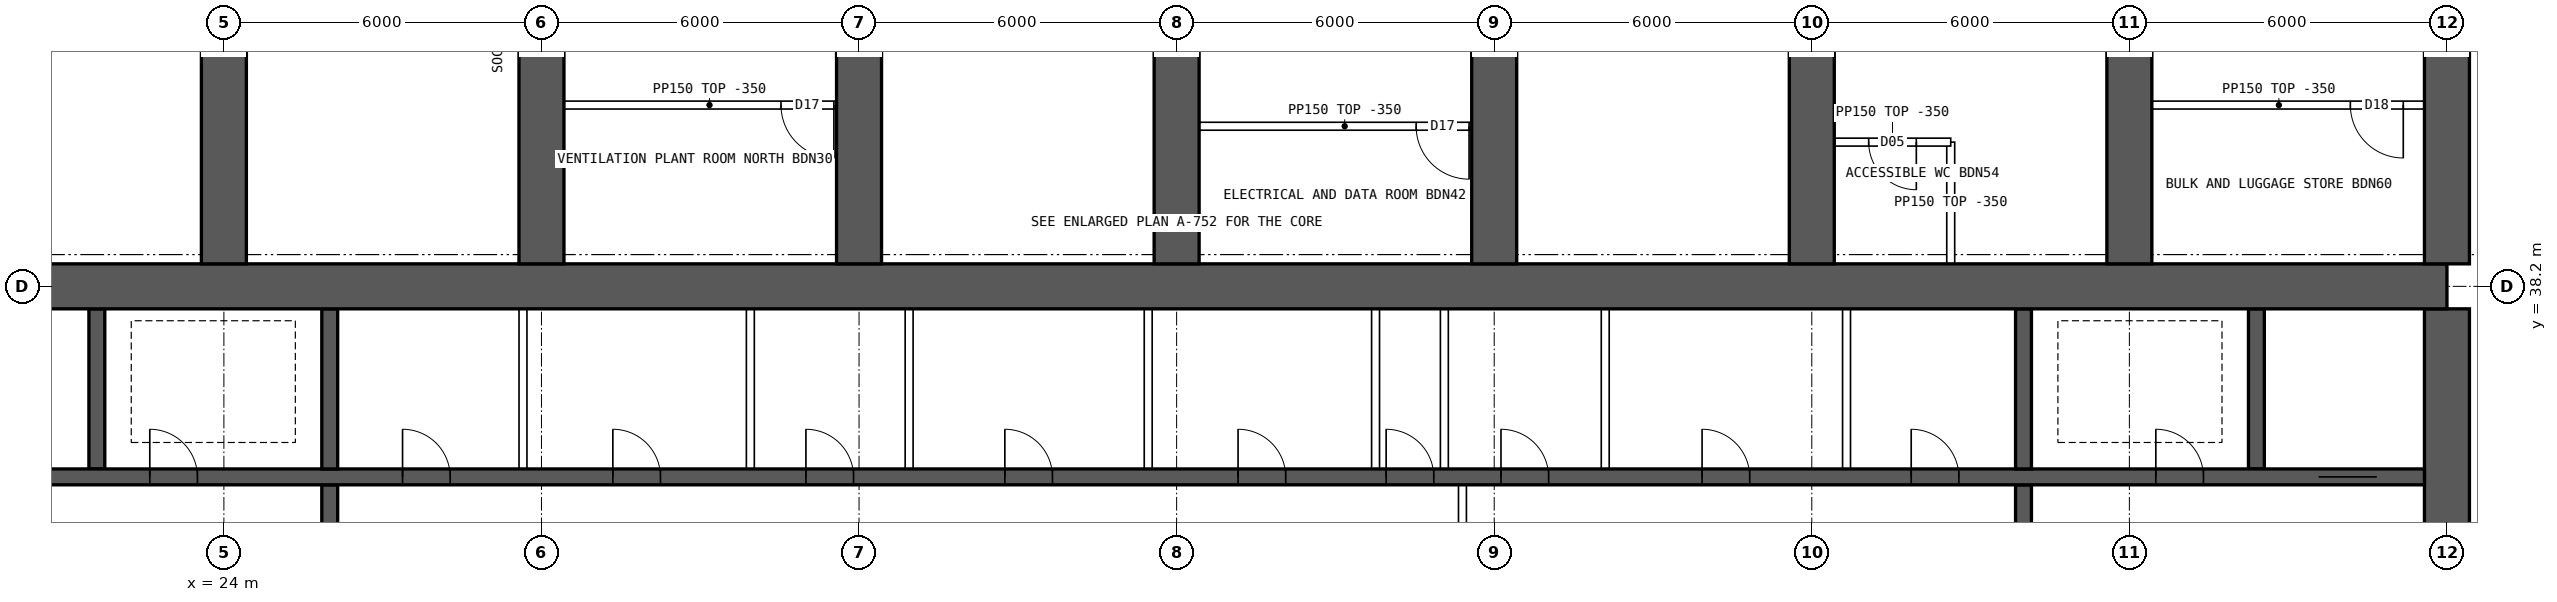
"""IFC4 building model, lengths in metres.
Left out: names, types, materials, properties, quantities, classifications, styles, units other than length and angle.
Written with IfcOpenShell. Run it as: python <this file> out.ifc"""

import sys

from ifc_helpers import new_model, si_unit, direction, frame, frame_2d, origin, place, context, subcontext, project, spatial, rectangle, extrude, element, fill, save


model = new_model("IFC4")
c1 = context("Model", 3, precision=1e-05, world=origin(), true_north=direction((0.0, 1.0)))
c2 = subcontext(c1, "Body", "Model", "MODEL_VIEW")
j1 = project(units=[si_unit("LENGTHUNIT", "METRE"), si_unit("PLANEANGLEUNIT", "RADIAN")], contexts=[c1])
p1 = place(None, origin())
s1 = spatial("IfcSite", under=j1, at=p1, CompositionType="ELEMENT")
p2 = place(p1, origin())
s2 = spatial("IfcBuilding", under=s1, at=p2, CompositionType="ELEMENT")
p3 = place(p2, frame((0.0, 0.0, 197.35)))
s3 = spatial("IfcBuildingStorey", under=s2, at=p3, CompositionType="ELEMENT", Elevation=197.35)
p4 = place(p3, frame((18.0, 38.2, 0.0), z_axis=(0.0, 0.0, 1.0), x_axis=(1.0, 0.0, 0.0)))
e1 = element("IfcWall", 1, at=p4, inside=s3, PredefinedType="SHEAR", context=c2, shape_type="SweptSolid", body=[
    extrude(rectangle(XDim=48.0, YDim=0.85, at=frame_2d((24.0, 0.0))), origin(), (0.0, 0.0, 1.0), 3.75),
])
p5 = place(p3, frame((66.0, 26.225, 0.0), z_axis=(0.0, 0.0, 1.0), x_axis=(0.0, 1.0, 0.0)))
e2 = element("IfcWall", 2, at=p5, inside=s3, PredefinedType="SHEAR", context=c2, shape_type="SweptSolid", body=[
    extrude(rectangle(XDim=11.55, YDim=0.85, at=frame_2d((5.775, 0.0))), origin(), (0.0, 0.0, 1.0), 3.75),
])
p6 = place(p5, frame((5.075, 0.0, 0.0)))
e3 = element("IfcOpeningElement", 3, at=p6, cuts=e2, PredefinedType="OPENING", context=c2, shape_type="SweptSolid", body=[
    extrude(rectangle(XDim=1.2, YDim=2.1, at=frame_2d((0.6, 1.05))), frame((0.0, 0.435, 0.0), z_axis=(0.0, -1.0, 0.0), x_axis=(1.0, 0.0, 0.0)), (0.0, 0.0, 1.0), 0.87),
])
p7 = place(p3, frame((18.425, 34.6, 0.0), z_axis=(0.0, 0.0, 1.0), x_axis=(1.0, 0.0, 0.0)))
e4 = element("IfcWall", 4, at=p7, inside=s3, PredefinedType="SHEAR", context=c2, shape_type="SweptSolid", body=[
    extrude(rectangle(XDim=47.15, YDim=0.3, at=frame_2d((23.575, 0.0))), origin(), (0.0, 0.0, 1.0), 3.75),
])
p8 = place(p7, frame((0.9, 0.0, 0.0)))
e5 = element("IfcOpeningElement", 5, at=p8, cuts=e4, PredefinedType="OPENING", context=c2, shape_type="SweptSolid", body=[
    extrude(rectangle(XDim=1.1, YDim=2.1, at=frame_2d((0.55, 1.05))), frame((0.0, 0.16, 0.0), z_axis=(0.0, -1.0, 0.0), x_axis=(1.0, 0.0, 0.0)), (0.0, 0.0, 1.0), 0.32),
])
p9 = place(p7, frame((45.15, 0.0, 0.0)))
e6 = element("IfcOpeningElement", 6, at=p9, cuts=e4, PredefinedType="OPENING", context=c2, shape_type="SweptSolid", body=[
    extrude(rectangle(XDim=1.1, YDim=2.1, at=frame_2d((0.55, 1.05))), frame((0.0, 0.16, 0.0), z_axis=(0.0, -1.0, 0.0), x_axis=(1.0, 0.0, 0.0)), (0.0, 0.0, 1.0), 0.32),
])
p10 = place(p7, frame((4.175, 0.0, 0.0)))
e7 = element("IfcOpeningElement", 7, at=p10, cuts=e4, PredefinedType="OPENING", context=c2, shape_type="SweptSolid", body=[
    extrude(rectangle(XDim=0.9, YDim=2.1, at=frame_2d((0.45, 1.05))), frame((0.0, 0.16, 0.0), z_axis=(0.0, -1.0, 0.0), x_axis=(1.0, 0.0, 0.0)), (0.0, 0.0, 1.0), 0.32),
])
p11 = place(p7, frame((42.075, 0.0, 0.0)))
e8 = element("IfcOpeningElement", 8, at=p11, cuts=e4, PredefinedType="OPENING", context=c2, shape_type="SweptSolid", body=[
    extrude(rectangle(XDim=0.9, YDim=2.1, at=frame_2d((0.45, 1.05))), frame((0.0, 0.16, 0.0), z_axis=(0.0, -1.0, 0.0), x_axis=(1.0, 0.0, 0.0)), (0.0, 0.0, 1.0), 0.32),
])
p12 = place(p7, frame((8.95, 0.0, 0.0)))
e9 = element("IfcOpeningElement", 9, at=p12, cuts=e4, PredefinedType="OPENING", context=c2, shape_type="SweptSolid", body=[
    extrude(rectangle(XDim=0.9, YDim=2.1, at=frame_2d((0.45, 1.05))), frame((0.0, 0.16, 0.0), z_axis=(0.0, -1.0, 0.0), x_axis=(1.0, 0.0, 0.0)), (0.0, 0.0, 1.0), 0.32),
])
p13 = place(p7, frame((12.924, 0.0, 0.0)))
e10 = element("IfcOpeningElement", 10, at=p13, cuts=e4, PredefinedType="OPENING", context=c2, shape_type="SweptSolid", body=[
    extrude(rectangle(XDim=0.9, YDim=2.1, at=frame_2d((0.45, 1.05))), frame((0.0, 0.16, 0.0), z_axis=(0.0, -1.0, 0.0), x_axis=(1.0, 0.0, 0.0)), (0.0, 0.0, 1.0), 0.32),
])
p14 = place(p7, frame((16.571, 0.0, 0.0)))
e11 = element("IfcOpeningElement", 11, at=p14, cuts=e4, PredefinedType="OPENING", context=c2, shape_type="SweptSolid", body=[
    extrude(rectangle(XDim=0.9, YDim=2.1, at=frame_2d((0.45, 1.05))), frame((0.0, 0.16, 0.0), z_axis=(0.0, -1.0, 0.0), x_axis=(1.0, 0.0, 0.0)), (0.0, 0.0, 1.0), 0.32),
])
p15 = place(p7, frame((20.33, 0.0, 0.0)))
e12 = element("IfcOpeningElement", 12, at=p15, cuts=e4, PredefinedType="OPENING", context=c2, shape_type="SweptSolid", body=[
    extrude(rectangle(XDim=0.9, YDim=2.1, at=frame_2d((0.45, 1.05))), frame((0.0, 0.16, 0.0), z_axis=(0.0, -1.0, 0.0), x_axis=(1.0, 0.0, 0.0)), (0.0, 0.0, 1.0), 0.32),
])
p16 = place(p7, frame((24.736, 0.0, 0.0)))
e13 = element("IfcOpeningElement", 13, at=p16, cuts=e4, PredefinedType="OPENING", context=c2, shape_type="SweptSolid", body=[
    extrude(rectangle(XDim=0.9, YDim=2.1, at=frame_2d((0.45, 1.05))), frame((0.0, 0.16, 0.0), z_axis=(0.0, -1.0, 0.0), x_axis=(1.0, 0.0, 0.0)), (0.0, 0.0, 1.0), 0.32),
])
p17 = place(p7, frame((27.533, 0.0, 0.0)))
e14 = element("IfcOpeningElement", 14, at=p17, cuts=e4, PredefinedType="OPENING", context=c2, shape_type="SweptSolid", body=[
    extrude(rectangle(XDim=0.9, YDim=2.1, at=frame_2d((0.45, 1.05))), frame((0.0, 0.16, 0.0), z_axis=(0.0, -1.0, 0.0), x_axis=(1.0, 0.0, 0.0)), (0.0, 0.0, 1.0), 0.32),
])
p18 = place(p7, frame((29.703, 0.0, 0.0)))
e15 = element("IfcOpeningElement", 15, at=p18, cuts=e4, PredefinedType="OPENING", context=c2, shape_type="SweptSolid", body=[
    extrude(rectangle(XDim=0.9, YDim=2.1, at=frame_2d((0.45, 1.05))), frame((0.0, 0.16, 0.0), z_axis=(0.0, -1.0, 0.0), x_axis=(1.0, 0.0, 0.0)), (0.0, 0.0, 1.0), 0.32),
])
p19 = place(p7, frame((33.502, 0.0, 0.0)))
e16 = element("IfcOpeningElement", 16, at=p19, cuts=e4, PredefinedType="OPENING", context=c2, shape_type="SweptSolid", body=[
    extrude(rectangle(XDim=0.9, YDim=2.1, at=frame_2d((0.45, 1.05))), frame((0.0, 0.16, 0.0), z_axis=(0.0, -1.0, 0.0), x_axis=(1.0, 0.0, 0.0)), (0.0, 0.0, 1.0), 0.32),
])
p20 = place(p7, frame((37.453, 0.0, 0.0)))
e17 = element("IfcOpeningElement", 17, at=p20, cuts=e4, PredefinedType="OPENING", context=c2, shape_type="SweptSolid", body=[
    extrude(rectangle(XDim=0.9, YDim=2.1, at=frame_2d((0.45, 1.05))), frame((0.0, 0.16, 0.0), z_axis=(0.0, -1.0, 0.0), x_axis=(1.0, 0.0, 0.0)), (0.0, 0.0, 1.0), 0.32),
])
p21 = place(p3, frame((26.0, 30.55, 0.0), z_axis=(0.0, 0.0, 1.0), x_axis=(0.0, 1.0, 0.0)))
e18 = element("IfcWall", 18, at=p21, inside=s3, PredefinedType="SHEAR", context=c2, shape_type="SweptSolid", body=[
    extrude(rectangle(XDim=3.9, YDim=0.3, at=frame_2d((1.95, 0.0))), origin(), (0.0, 0.0, 1.0), 3.75),
])
p22 = place(p21, frame((1.4, 0.0, 0.0)))
e19 = element("IfcOpeningElement", 19, at=p22, cuts=e18, PredefinedType="OPENING", context=c2, shape_type="SweptSolid", body=[
    extrude(rectangle(XDim=1.2, YDim=2.1, at=frame_2d((0.6, 1.05))), frame((0.0, 0.16, 0.0), z_axis=(0.0, -1.0, 0.0), x_axis=(1.0, 0.0, 0.0)), (0.0, 0.0, 1.0), 0.32),
])
p23 = place(p3, frame((58.0, 30.55, 0.0), z_axis=(0.0, 0.0, 1.0), x_axis=(0.0, 1.0, 0.0)))
e20 = element("IfcWall", 20, at=p23, inside=s3, PredefinedType="SHEAR", context=c2, shape_type="SweptSolid", body=[
    extrude(rectangle(XDim=3.9, YDim=0.3, at=frame_2d((1.95, 0.0))), origin(), (0.0, 0.0, 1.0), 3.75),
])
p24 = place(p23, frame((1.4, 0.0, 0.0)))
e21 = element("IfcOpeningElement", 21, at=p24, cuts=e20, PredefinedType="OPENING", context=c2, shape_type="SweptSolid", body=[
    extrude(rectangle(XDim=1.2, YDim=2.1, at=frame_2d((0.6, 1.05))), frame((0.0, 0.16, 0.0), z_axis=(0.0, -1.0, 0.0), x_axis=(1.0, 0.0, 0.0)), (0.0, 0.0, 1.0), 0.32),
])
for number, where, z_axis, x_axis in (
    (22, (21.6, 34.75, 0.0), (0.0, 0.0, 1.0), (0.0, 1.0, 0.0)),
    (23, (62.4, 34.75, 0.0), (0.0, 0.0, 1.0), (0.0, 1.0, 0.0)),
    (24, (26.0, 34.75, 0.0), (0.0, 0.0, 1.0), (0.0, 1.0, 0.0)),
    (25, (58.0, 34.75, 0.0), (0.0, 0.0, 1.0), (0.0, 1.0, 0.0)),
):
    element("IfcWall", number, at=place(p3, frame(where, z_axis=z_axis, x_axis=x_axis)), inside=s3, PredefinedType="SHEAR", context=c2, shape_type="SweptSolid", body=[
        extrude(rectangle(XDim=3.025, YDim=0.3, at=frame_2d((1.512, 0.0))), origin(), (0.0, 0.0, 1.0), 3.75),
    ])
for number, where, z_axis, x_axis in (
    (26, (24.0, 38.625, 0.0), (0.0, 0.0, 1.0), (0.0, 1.0, 0.0)),
    (27, (30.0, 38.625, 0.0), (0.0, 0.0, 1.0), (0.0, 1.0, 0.0)),
    (28, (36.0, 38.625, 0.0), (0.0, 0.0, 1.0), (0.0, 1.0, 0.0)),
    (29, (42.0, 38.625, 0.0), (0.0, 0.0, 1.0), (0.0, 1.0, 0.0)),
    (30, (48.0, 38.625, 0.0), (0.0, 0.0, 1.0), (0.0, 1.0, 0.0)),
    (31, (54.0, 38.625, 0.0), (0.0, 0.0, 1.0), (0.0, 1.0, 0.0)),
    (32, (60.0, 38.625, 0.0), (0.0, 0.0, 1.0), (0.0, 1.0, 0.0)),
    (33, (66.0, 38.625, 0.0), (0.0, 0.0, 1.0), (0.0, 1.0, 0.0)),
):
    element("IfcWall", number, at=place(p3, frame(where, z_axis=z_axis, x_axis=x_axis)), inside=s3, PredefinedType="SHEAR", context=c2, shape_type="SweptSolid", body=[
        extrude(rectangle(XDim=8.175, YDim=0.85, at=frame_2d((4.087, 0.0))), origin(), (0.0, 0.0, 1.0), 3.75),
    ])
p25 = place(p3, frame((47.4, 30.55, 0.0), z_axis=(0.0, 0.0, 1.0), x_axis=(0.0, 1.0, 0.0)))
e34 = element("IfcWall", 34, at=p25, inside=s3, PredefinedType="SOLIDWALL", context=c2, shape_type="SweptSolid", body=[
    extrude(rectangle(XDim=3.9, YDim=0.15, at=frame_2d((1.95, 0.0))), origin(), (0.0, 0.0, 1.0), 3.4),
])
p26 = place(p25, frame((1.15, 0.0, 0.0)))
e35 = element("IfcOpeningElement", 35, at=p26, cuts=e34, PredefinedType="OPENING", context=c2, shape_type="SweptSolid", body=[
    extrude(rectangle(XDim=1.6, YDim=2.1, at=frame_2d((0.8, 1.05))), frame((0.0, 0.085, 0.0), z_axis=(0.0, -1.0, 0.0), x_axis=(1.0, 0.0, 0.0)), (0.0, 0.0, 1.0), 0.17),
])
for number, where, z_axis, x_axis in (
    (36, (29.651, 34.75, 0.0), (0.0, 0.0, 1.0), (0.0, 1.0, 0.0)),
    (37, (33.946, 34.75, 0.0), (0.0, 0.0, 1.0), (0.0, 1.0, 0.0)),
    (38, (36.946, 34.75, 0.0), (0.0, 0.0, 1.0), (0.0, 1.0, 0.0)),
    (39, (41.463, 34.75, 0.0), (0.0, 0.0, 1.0), (0.0, 1.0, 0.0)),
    (40, (45.758, 34.75, 0.0), (0.0, 0.0, 1.0), (0.0, 1.0, 0.0)),
    (41, (47.058, 34.75, 0.0), (0.0, 0.0, 1.0), (0.0, 1.0, 0.0)),
    (42, (50.098, 34.75, 0.0), (0.0, 0.0, 1.0), (0.0, 1.0, 0.0)),
    (43, (54.657, 34.75, 0.0), (0.0, 0.0, 1.0), (0.0, 1.0, 0.0)),
):
    element("IfcWall", number, at=place(p3, frame(where, z_axis=z_axis, x_axis=x_axis)), inside=s3, PredefinedType="SOLIDWALL", context=c2, shape_type="SweptSolid", body=[
        extrude(rectangle(XDim=3.025, YDim=0.15, at=frame_2d((1.512, 0.0))), origin(), (0.0, 0.0, 1.0), 3.4),
    ])
p27 = place(p3, frame((35.925, 41.625, 0.0), z_axis=(0.0, 0.0, 1.0), x_axis=(-1.0, 0.0, 0.0)))
e44 = element("IfcWall", 44, at=p27, inside=s3, PredefinedType="PARTITIONING", context=c2, shape_type="SweptSolid", body=[
    extrude(rectangle(XDim=5.5, YDim=0.15, at=frame_2d((2.75, 0.0))), origin(), (0.0, 0.0, 1.0), 3.4),
])
p28 = place(p27, frame((0.4, 0.0, 0.0)))
e45 = element("IfcOpeningElement", 45, at=p28, cuts=e44, PredefinedType="OPENING", context=c2, shape_type="SweptSolid", body=[
    extrude(rectangle(XDim=1.0, YDim=2.1, at=frame_2d((0.5, 1.05))), frame((0.0, 0.085, 0.0), z_axis=(0.0, -1.0, 0.0), x_axis=(1.0, 0.0, 0.0)), (0.0, 0.0, 1.0), 0.17),
])
p29 = place(p3, frame((47.925, 41.225, 0.0), z_axis=(0.0, 0.0, 1.0), x_axis=(-1.0, 0.0, 0.0)))
e46 = element("IfcWall", 46, at=p29, inside=s3, PredefinedType="PARTITIONING", context=c2, shape_type="SweptSolid", body=[
    extrude(rectangle(XDim=5.5, YDim=0.15, at=frame_2d((2.75, 0.0))), origin(), (0.0, 0.0, 1.0), 3.4),
])
p30 = place(p29, frame((0.4, 0.0, 0.0)))
e47 = element("IfcOpeningElement", 47, at=p30, cuts=e46, PredefinedType="OPENING", context=c2, shape_type="SweptSolid", body=[
    extrude(rectangle(XDim=1.0, YDim=2.1, at=frame_2d((0.5, 1.05))), frame((0.0, 0.085, 0.0), z_axis=(0.0, -1.0, 0.0), x_axis=(1.0, 0.0, 0.0)), (0.0, 0.0, 1.0), 0.17),
])
p31 = place(p3, frame((56.625, 40.925, 0.0), z_axis=(0.0, 0.0, 1.0), x_axis=(0.0, -1.0, 0.0)))
e48 = element("IfcWall", 48, at=p31, inside=s3, PredefinedType="PARTITIONING", context=c2, shape_type="SweptSolid", body=[
    extrude(rectangle(XDim=2.3, YDim=0.15, at=frame_2d((1.15, 0.0))), origin(), (0.0, 0.0, 1.0), 3.4),
])
p32 = place(p3, frame((56.625, 40.925, 0.0), z_axis=(0.0, 0.0, 1.0), x_axis=(-1.0, 0.0, 0.0)))
e49 = element("IfcWall", 49, at=p32, inside=s3, PredefinedType="PARTITIONING", context=c2, shape_type="SweptSolid", body=[
    extrude(rectangle(XDim=2.2, YDim=0.15, at=frame_2d((1.1, 0.0))), origin(), (0.0, 0.0, 1.0), 3.4),
])
p33 = place(p32, frame((0.65, 0.0, 0.0)))
e50 = element("IfcOpeningElement", 50, at=p33, cuts=e49, PredefinedType="OPENING", context=c2, shape_type="SweptSolid", body=[
    extrude(rectangle(XDim=0.9, YDim=2.1, at=frame_2d((0.45, 1.05))), frame((0.0, 0.085, 0.0), z_axis=(0.0, -1.0, 0.0), x_axis=(1.0, 0.0, 0.0)), (0.0, 0.0, 1.0), 0.17),
])
p34 = place(p3, frame((65.575, 41.625, 0.0), z_axis=(0.0, 0.0, 1.0), x_axis=(-1.0, 0.0, 0.0)))
e51 = element("IfcWall", 51, at=p34, inside=s3, PredefinedType="PARTITIONING", context=c2, shape_type="SweptSolid", body=[
    extrude(rectangle(XDim=5.5, YDim=0.15, at=frame_2d((2.75, 0.0))), origin(), (0.0, 0.0, 1.0), 3.4),
])
p35 = place(p34, frame((0.4, 0.0, 0.0)))
e52 = element("IfcOpeningElement", 52, at=p35, cuts=e51, PredefinedType="OPENING", context=c2, shape_type="SweptSolid", body=[
    extrude(rectangle(XDim=1.0, YDim=2.1, at=frame_2d((0.5, 1.05))), frame((0.0, 0.085, 0.0), z_axis=(0.0, -1.0, 0.0), x_axis=(1.0, 0.0, 0.0)), (0.0, 0.0, 1.0), 0.17),
])
p36 = place(p9, origin())
e53 = element("IfcDoor", 53, at=p36, inside=s3, OperationType="DOUBLE_DOOR_SLIDING", PredefinedType="DOOR", context=c2, shape_type="SweptSolid", body=[
    extrude(rectangle(XDim=1.1, YDim=2.1, at=frame_2d((0.55, 1.05))), frame((0.0, 0.025, 0.0), z_axis=(0.0, -1.0, 0.0), x_axis=(1.0, 0.0, 0.0)), (0.0, 0.0, 1.0), 0.05),
])
fill(e6, e53)
p37 = place(p10, origin())
e54 = element("IfcDoor", 54, at=p37, inside=s3, OperationType="SINGLE_SWING_LEFT", PredefinedType="DOOR", context=c2, shape_type="SweptSolid", body=[
    extrude(rectangle(XDim=0.9, YDim=2.1, at=frame_2d((0.45, 1.05))), frame((0.0, 0.025, 0.0), z_axis=(0.0, -1.0, 0.0), x_axis=(1.0, 0.0, 0.0)), (0.0, 0.0, 1.0), 0.05),
])
fill(e7, e54)
p38 = place(p11, origin())
e55 = element("IfcDoor", 55, at=p38, inside=s3, OperationType="SINGLE_SWING_LEFT", PredefinedType="DOOR", context=c2, shape_type="SweptSolid", body=[
    extrude(rectangle(XDim=0.9, YDim=2.1, at=frame_2d((0.45, 1.05))), frame((0.0, 0.025, 0.0), z_axis=(0.0, -1.0, 0.0), x_axis=(1.0, 0.0, 0.0)), (0.0, 0.0, 1.0), 0.05),
])
fill(e8, e55)
p39 = place(p12, origin())
e56 = element("IfcDoor", 56, at=p39, inside=s3, OperationType="SINGLE_SWING_LEFT", PredefinedType="DOOR", context=c2, shape_type="SweptSolid", body=[
    extrude(rectangle(XDim=0.9, YDim=2.1, at=frame_2d((0.45, 1.05))), frame((0.0, 0.025, 0.0), z_axis=(0.0, -1.0, 0.0), x_axis=(1.0, 0.0, 0.0)), (0.0, 0.0, 1.0), 0.05),
])
fill(e9, e56)
p40 = place(p13, origin())
e57 = element("IfcDoor", 57, at=p40, inside=s3, OperationType="SINGLE_SWING_LEFT", PredefinedType="DOOR", context=c2, shape_type="SweptSolid", body=[
    extrude(rectangle(XDim=0.9, YDim=2.1, at=frame_2d((0.45, 1.05))), frame((0.0, 0.025, 0.0), z_axis=(0.0, -1.0, 0.0), x_axis=(1.0, 0.0, 0.0)), (0.0, 0.0, 1.0), 0.05),
])
fill(e10, e57)
p41 = place(p14, origin())
e58 = element("IfcDoor", 58, at=p41, inside=s3, OperationType="SINGLE_SWING_LEFT", PredefinedType="DOOR", context=c2, shape_type="SweptSolid", body=[
    extrude(rectangle(XDim=0.9, YDim=2.1, at=frame_2d((0.45, 1.05))), frame((0.0, 0.025, 0.0), z_axis=(0.0, -1.0, 0.0), x_axis=(1.0, 0.0, 0.0)), (0.0, 0.0, 1.0), 0.05),
])
fill(e11, e58)
p42 = place(p15, origin())
e59 = element("IfcDoor", 59, at=p42, inside=s3, OperationType="SINGLE_SWING_LEFT", PredefinedType="DOOR", context=c2, shape_type="SweptSolid", body=[
    extrude(rectangle(XDim=0.9, YDim=2.1, at=frame_2d((0.45, 1.05))), frame((0.0, 0.025, 0.0), z_axis=(0.0, -1.0, 0.0), x_axis=(1.0, 0.0, 0.0)), (0.0, 0.0, 1.0), 0.05),
])
fill(e12, e59)
p43 = place(p16, origin())
e60 = element("IfcDoor", 60, at=p43, inside=s3, OperationType="SINGLE_SWING_LEFT", PredefinedType="DOOR", context=c2, shape_type="SweptSolid", body=[
    extrude(rectangle(XDim=0.9, YDim=2.1, at=frame_2d((0.45, 1.05))), frame((0.0, 0.025, 0.0), z_axis=(0.0, -1.0, 0.0), x_axis=(1.0, 0.0, 0.0)), (0.0, 0.0, 1.0), 0.05),
])
fill(e13, e60)
p44 = place(p17, origin())
e61 = element("IfcDoor", 61, at=p44, inside=s3, OperationType="SINGLE_SWING_LEFT", PredefinedType="DOOR", context=c2, shape_type="SweptSolid", body=[
    extrude(rectangle(XDim=0.9, YDim=2.1, at=frame_2d((0.45, 1.05))), frame((0.0, 0.025, 0.0), z_axis=(0.0, -1.0, 0.0), x_axis=(1.0, 0.0, 0.0)), (0.0, 0.0, 1.0), 0.05),
])
fill(e14, e61)
p45 = place(p18, origin())
e62 = element("IfcDoor", 62, at=p45, inside=s3, OperationType="SINGLE_SWING_LEFT", PredefinedType="DOOR", context=c2, shape_type="SweptSolid", body=[
    extrude(rectangle(XDim=0.9, YDim=2.1, at=frame_2d((0.45, 1.05))), frame((0.0, 0.025, 0.0), z_axis=(0.0, -1.0, 0.0), x_axis=(1.0, 0.0, 0.0)), (0.0, 0.0, 1.0), 0.05),
])
fill(e15, e62)
p46 = place(p19, origin())
e63 = element("IfcDoor", 63, at=p46, inside=s3, OperationType="SINGLE_SWING_LEFT", PredefinedType="DOOR", context=c2, shape_type="SweptSolid", body=[
    extrude(rectangle(XDim=0.9, YDim=2.1, at=frame_2d((0.45, 1.05))), frame((0.0, 0.025, 0.0), z_axis=(0.0, -1.0, 0.0), x_axis=(1.0, 0.0, 0.0)), (0.0, 0.0, 1.0), 0.05),
])
fill(e16, e63)
p47 = place(p20, origin())
e64 = element("IfcDoor", 64, at=p47, inside=s3, OperationType="SINGLE_SWING_LEFT", PredefinedType="DOOR", context=c2, shape_type="SweptSolid", body=[
    extrude(rectangle(XDim=0.9, YDim=2.1, at=frame_2d((0.45, 1.05))), frame((0.0, 0.025, 0.0), z_axis=(0.0, -1.0, 0.0), x_axis=(1.0, 0.0, 0.0)), (0.0, 0.0, 1.0), 0.05),
])
fill(e17, e64)
p48 = place(p28, origin())
e65 = element("IfcDoor", 65, at=p48, inside=s3, OperationType="SINGLE_SWING_LEFT", PredefinedType="DOOR", context=c2, shape_type="SweptSolid", body=[
    extrude(rectangle(XDim=1.0, YDim=2.1, at=frame_2d((0.5, 1.05))), frame((0.0, 0.025, 0.0), z_axis=(0.0, -1.0, 0.0), x_axis=(1.0, 0.0, 0.0)), (0.0, 0.0, 1.0), 0.05),
])
fill(e45, e65)
p49 = place(p30, origin())
e66 = element("IfcDoor", 66, at=p49, inside=s3, OperationType="SINGLE_SWING_LEFT", PredefinedType="DOOR", context=c2, shape_type="SweptSolid", body=[
    extrude(rectangle(XDim=1.0, YDim=2.1, at=frame_2d((0.5, 1.05))), frame((0.0, 0.025, 0.0), z_axis=(0.0, -1.0, 0.0), x_axis=(1.0, 0.0, 0.0)), (0.0, 0.0, 1.0), 0.05),
])
fill(e47, e66)
p50 = place(p33, origin())
e67 = element("IfcDoor", 67, at=p50, inside=s3, OperationType="SINGLE_SWING_LEFT", PredefinedType="DOOR", context=c2, shape_type="SweptSolid", body=[
    extrude(rectangle(XDim=0.9, YDim=2.1, at=frame_2d((0.45, 1.05))), frame((0.0, 0.025, 0.0), z_axis=(0.0, -1.0, 0.0), x_axis=(1.0, 0.0, 0.0)), (0.0, 0.0, 1.0), 0.05),
])
fill(e50, e67)
p51 = place(p35, origin())
e68 = element("IfcDoor", 68, at=p51, inside=s3, OperationType="SINGLE_SWING_LEFT", PredefinedType="DOOR", context=c2, shape_type="SweptSolid", body=[
    extrude(rectangle(XDim=1.0, YDim=2.1, at=frame_2d((0.5, 1.05))), frame((0.0, 0.025, 0.0), z_axis=(0.0, -1.0, 0.0), x_axis=(1.0, 0.0, 0.0)), (0.0, 0.0, 1.0), 0.05),
])
fill(e52, e68)
save(model, sys.argv[1])
